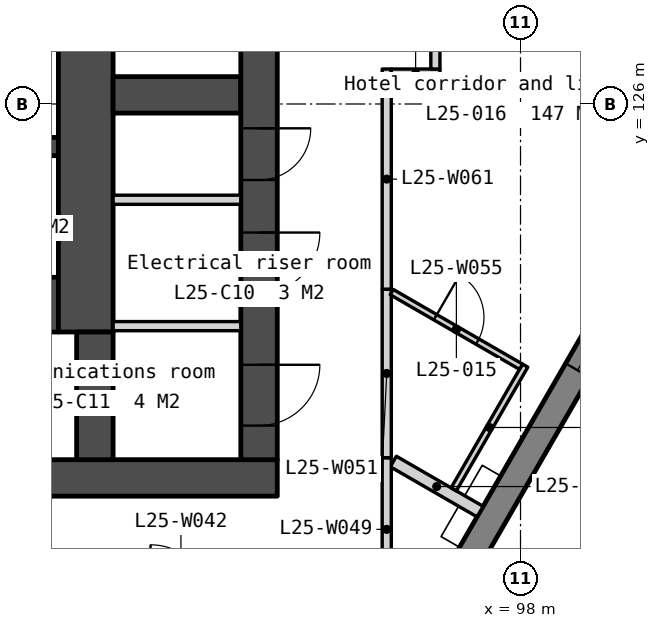
"""IFC4 building model, lengths in metres.
Left out: names, types, materials, properties, quantities, classifications, styles, units other than length and angle.
Written with IfcOpenShell. Run it as: python <this file> out.ifc"""

import sys

from ifc_helpers import new_model, si_unit, direction, frame, frame_2d, origin, place, context, subcontext, project, spatial, polyline, rectangle, outline, extrude, element, fill, save


model = new_model("IFC4")
c1 = context("Model", 3, precision=1e-05, world=origin(), true_north=direction((0.0, 1.0)))
c2 = subcontext(c1, "Body", "Model", "MODEL_VIEW")
j1 = project(units=[si_unit("LENGTHUNIT", "METRE"), si_unit("PLANEANGLEUNIT", "RADIAN")], contexts=[c1])
p1 = place(None, origin())
s1 = spatial("IfcSite", under=j1, at=p1, CompositionType="ELEMENT")
p2 = place(p1, origin())
s2 = spatial("IfcBuilding", under=s1, at=p2, CompositionType="ELEMENT")
p3 = place(p2, frame((0.0, 0.0, 102.8)))
s3 = spatial("IfcBuildingStorey", under=s2, at=p3, CompositionType="ELEMENT", Elevation=102.8)
p4 = place(p3, frame((66.0, 119.85, 0.0), z_axis=(0.0, 0.0, 1.0), x_axis=(1.0, 0.0, 0.0)))
e1 = element("IfcWall", 1, at=p4, inside=s3, PredefinedType="SOLIDWALL", context=c2, shape_type="SweptSolid", body=[
    extrude(rectangle(XDim=28.0, YDim=0.6, at=frame_2d((14.0, 0.0))), origin(), (0.0, 0.0, 1.0), 3.35),
])
p5 = place(p4, frame((6.825, 0.0, 0.0)))
e2 = element("IfcOpeningElement", 2, at=p5, cuts=e1, PredefinedType="OPENING", context=c2, shape_type="SweptSolid", body=[
    extrude(rectangle(XDim=1.8, YDim=2.1, at=frame_2d((0.9, 1.05))), frame((0.0, 0.31, 0.0), z_axis=(0.0, -1.0, 0.0), x_axis=(1.0, 0.0, 0.0)), (0.0, 0.0, 1.0), 0.62),
])
p6 = place(p4, frame((15.85, 0.0, 0.0)))
e3 = element("IfcOpeningElement", 3, at=p6, cuts=e1, PredefinedType="OPENING", context=c2, shape_type="SweptSolid", body=[
    extrude(rectangle(XDim=1.5, YDim=2.1, at=frame_2d((0.75, 1.05))), frame((0.0, 0.31, 0.0), z_axis=(0.0, -1.0, 0.0), x_axis=(1.0, 0.0, 0.0)), (0.0, 0.0, 1.0), 0.62),
])
p7 = place(p4, frame((19.375, 0.0, 0.0)))
e4 = element("IfcOpeningElement", 4, at=p7, cuts=e1, PredefinedType="OPENING", context=c2, shape_type="SweptSolid", body=[
    extrude(rectangle(XDim=1.8, YDim=2.1, at=frame_2d((0.9, 1.05))), frame((0.0, 0.31, 0.0), z_axis=(0.0, -1.0, 0.0), x_axis=(1.0, 0.0, 0.0)), (0.0, 0.0, 1.0), 0.62),
])
p8 = place(p4, frame((4.425, 0.0, 0.0)))
e5 = element("IfcOpeningElement", 5, at=p8, cuts=e1, PredefinedType="OPENING", context=c2, shape_type="SweptSolid", body=[
    extrude(rectangle(XDim=1.0, YDim=2.1, at=frame_2d((0.5, 1.05))), frame((0.0, 0.31, 0.0), z_axis=(0.0, -1.0, 0.0), x_axis=(1.0, 0.0, 0.0)), (0.0, 0.0, 1.0), 0.62),
])
p9 = place(p4, frame((9.783, 0.0, 0.0)))
e6 = element("IfcOpeningElement", 6, at=p9, cuts=e1, PredefinedType="OPENING", context=c2, shape_type="SweptSolid", body=[
    extrude(rectangle(XDim=1.0, YDim=2.1, at=frame_2d((0.5, 1.05))), frame((0.0, 0.31, 0.0), z_axis=(0.0, -1.0, 0.0), x_axis=(1.0, 0.0, 0.0)), (0.0, 0.0, 1.0), 0.62),
])
p10 = place(p4, frame((11.525, 0.0, 0.0)))
e7 = element("IfcOpeningElement", 7, at=p10, cuts=e1, PredefinedType="OPENING", context=c2, shape_type="SweptSolid", body=[
    extrude(rectangle(XDim=1.0, YDim=2.1, at=frame_2d((0.5, 1.05))), frame((0.0, 0.31, 0.0), z_axis=(0.0, -1.0, 0.0), x_axis=(1.0, 0.0, 0.0)), (0.0, 0.0, 1.0), 0.62),
])
p11 = place(p4, frame((13.658, 0.0, 0.0)))
e8 = element("IfcOpeningElement", 8, at=p11, cuts=e1, PredefinedType="OPENING", context=c2, shape_type="SweptSolid", body=[
    extrude(rectangle(XDim=1.0, YDim=2.1, at=frame_2d((0.5, 1.05))), frame((0.0, 0.31, 0.0), z_axis=(0.0, -1.0, 0.0), x_axis=(1.0, 0.0, 0.0)), (0.0, 0.0, 1.0), 0.62),
])
p12 = place(p4, frame((22.575, 0.0, 0.0)))
e9 = element("IfcOpeningElement", 9, at=p12, cuts=e1, PredefinedType="OPENING", context=c2, shape_type="SweptSolid", body=[
    extrude(rectangle(XDim=1.0, YDim=2.1, at=frame_2d((0.5, 1.05))), frame((0.0, 0.31, 0.0), z_axis=(0.0, -1.0, 0.0), x_axis=(1.0, 0.0, 0.0)), (0.0, 0.0, 1.0), 0.62),
])
p13 = place(p3, frame((87.85, 125.3, 0.0), z_axis=(0.0, 0.0, 1.0), x_axis=(1.0, 0.0, 0.0)))
e10 = element("IfcWall", 10, at=p13, inside=s3, PredefinedType="SOLIDWALL", context=c2, shape_type="SweptSolid", body=[
    extrude(rectangle(XDim=2.55, YDim=0.3, at=frame_2d((1.275, 0.0))), origin(), (0.0, 0.0, 1.0), 3.35),
])
p14 = place(p3, frame((87.85, 122.7, 0.0), z_axis=(0.0, 0.0, 1.0), x_axis=(1.0, 0.0, 0.0)))
e11 = element("IfcWall", 11, at=p14, inside=s3, PredefinedType="SOLIDWALL", context=c2, shape_type="SweptSolid", body=[
    extrude(rectangle(XDim=2.55, YDim=0.9, at=frame_2d((1.275, 0.0))), origin(), (0.0, 0.0, 1.0), 3.35),
])
p15 = place(p3, frame((90.85, 133.95, 0.0), z_axis=(0.0, 0.0, 1.0), x_axis=(0.0, -1.0, 0.0)))
e12 = element("IfcWall", 12, at=p15, inside=s3, PredefinedType="SOLIDWALL", context=c2, shape_type="SweptSolid", body=[
    extrude(rectangle(XDim=11.7, YDim=0.9, at=frame_2d((5.85, 0.0))), origin(), (0.0, 0.0, 1.0), 3.35),
])
p16 = place(p3, frame((91.0, 122.25, 0.0), z_axis=(0.0, 0.0, 1.0), x_axis=(0.0, -1.0, 0.0)))
e13 = element("IfcWall", 13, at=p16, inside=s3, PredefinedType="SOLIDWALL", context=c2, shape_type="SweptSolid", body=[
    extrude(rectangle(XDim=2.1, YDim=0.6, at=frame_2d((1.05, 0.0))), origin(), (0.0, 0.0, 1.0), 3.35),
])
p17 = place(p3, frame((91.3, 126.15, 0.0), z_axis=(0.0, 0.0, 1.0), x_axis=(1.0, 0.0, 0.0)))
e14 = element("IfcWall", 14, at=p17, inside=s3, PredefinedType="SOLIDWALL", context=c2, shape_type="SweptSolid", body=[
    extrude(rectangle(XDim=2.1, YDim=0.6, at=frame_2d((1.05, 0.0))), origin(), (0.0, 0.0, 1.0), 3.35),
])
for number, where, z_axis, x_axis in (
    (15, (91.3, 124.425, 0.0), (0.0, 0.0, 1.0), (1.0, 0.0, 0.0)),
    (16, (91.3, 122.346, 0.0), (0.0, 0.0, 1.0), (1.0, 0.0, 0.0)),
):
    element("IfcWall", number, at=place(p3, frame(where, z_axis=z_axis, x_axis=x_axis)), inside=s3, PredefinedType="PARTITIONING", context=c2, shape_type="SweptSolid", body=[
        extrude(rectangle(XDim=2.1, YDim=0.15, at=frame_2d((1.05, 0.0))), origin(), (0.0, 0.0, 1.0), 3.35),
    ])
p18 = place(p3, frame((93.7, 133.95, 0.0), z_axis=(0.0, 0.0, 1.0), x_axis=(0.0, -1.0, 0.0)))
e17 = element("IfcWall", 17, at=p18, inside=s3, PredefinedType="SOLIDWALL", context=c2, shape_type="SweptSolid", body=[
    extrude(rectangle(XDim=13.8, YDim=0.6, at=frame_2d((6.9, 0.0))), origin(), (0.0, 0.0, 1.0), 3.35),
])
p19 = place(p18, frame((0.6, 0.0, 0.0)))
e18 = element("IfcOpeningElement", 18, at=p19, cuts=e17, PredefinedType="OPENING", context=c2, shape_type="SweptSolid", body=[
    extrude(rectangle(XDim=1.1, YDim=2.1, at=frame_2d((0.55, 1.05))), frame((0.0, 0.31, 0.0), z_axis=(0.0, -1.0, 0.0), x_axis=(1.0, 0.0, 0.0)), (0.0, 0.0, 1.0), 0.62),
])
p20 = place(p18, frame((10.064, 0.0, 0.0)))
e19 = element("IfcOpeningElement", 19, at=p20, cuts=e17, PredefinedType="OPENING", context=c2, shape_type="SweptSolid", body=[
    extrude(rectangle(XDim=1.0, YDim=2.1, at=frame_2d((0.5, 1.05))), frame((0.0, 0.31, 0.0), z_axis=(0.0, -1.0, 0.0), x_axis=(1.0, 0.0, 0.0)), (0.0, 0.0, 1.0), 0.62),
])
p21 = place(p18, frame((8.35, 0.0, 0.0)))
e20 = element("IfcOpeningElement", 20, at=p21, cuts=e17, PredefinedType="OPENING", context=c2, shape_type="SweptSolid", body=[
    extrude(rectangle(XDim=0.85, YDim=2.1, at=frame_2d((0.425, 1.05))), frame((0.0, 0.31, 0.0), z_axis=(0.0, -1.0, 0.0), x_axis=(1.0, 0.0, 0.0)), (0.0, 0.0, 1.0), 0.62),
])
p22 = place(p18, frame((12.239, 0.0, 0.0)))
e21 = element("IfcOpeningElement", 21, at=p22, cuts=e17, PredefinedType="OPENING", context=c2, shape_type="SweptSolid", body=[
    extrude(rectangle(XDim=1.0, YDim=2.1, at=frame_2d((0.5, 1.05))), frame((0.0, 0.31, 0.0), z_axis=(0.0, -1.0, 0.0), x_axis=(1.0, 0.0, 0.0)), (0.0, 0.0, 1.0), 0.62),
])
p23 = place(p3, frame((82.605, 93.333, -0.15), z_axis=(0.0, 0.0, 1.0), x_axis=(0.500000478905, 0.866025127289, 0.0)))
e22 = element("IfcWall", 22, at=p23, inside=s3, PredefinedType="SOLIDWALL", context=c2, shape_type="SweptSolid", body=[
    extrude(outline(polyline([(42.643, 0.0), (42.643, 3.5), (0.0, 3.5), (0.0, 0.0), (42.643, 0.0)])), frame((0.0, 0.225, 0.0), z_axis=(0.0, -1.0, 0.0), x_axis=(1.0, 0.0, 0.0)), (0.0, 0.0, 1.0), 0.45),
])
p24 = place(p23, frame((0.72, 0.0, 1.05)))
e23 = element("IfcOpeningElement", 23, at=p24, cuts=e22, PredefinedType="OPENING", context=c2, shape_type="SweptSolid", body=[
    extrude(rectangle(XDim=1.2, YDim=1.5, at=frame_2d((0.6, 0.75))), frame((0.0, 0.235, 0.0), z_axis=(0.0, -1.0, 0.0), x_axis=(1.0, 0.0, 0.0)), (0.0, 0.0, 1.0), 0.47),
])
p25 = place(p23, frame((7.079, 0.0, 1.05)))
e24 = element("IfcOpeningElement", 24, at=p25, cuts=e22, PredefinedType="OPENING", context=c2, shape_type="SweptSolid", body=[
    extrude(rectangle(XDim=1.2, YDim=1.5, at=frame_2d((0.6, 0.75))), frame((0.0, 0.235, 0.0), z_axis=(0.0, -1.0, 0.0), x_axis=(1.0, 0.0, 0.0)), (0.0, 0.0, 1.0), 0.47),
])
p26 = place(p23, frame((8.779, 0.0, 1.05)))
e25 = element("IfcOpeningElement", 25, at=p26, cuts=e22, PredefinedType="OPENING", context=c2, shape_type="SweptSolid", body=[
    extrude(rectangle(XDim=1.2, YDim=1.5, at=frame_2d((0.6, 0.75))), frame((0.0, 0.235, 0.0), z_axis=(0.0, -1.0, 0.0), x_axis=(1.0, 0.0, 0.0)), (0.0, 0.0, 1.0), 0.47),
])
p27 = place(p23, frame((15.607, 0.0, 1.05)))
e26 = element("IfcOpeningElement", 26, at=p27, cuts=e22, PredefinedType="OPENING", context=c2, shape_type="SweptSolid", body=[
    extrude(rectangle(XDim=1.2, YDim=1.5, at=frame_2d((0.6, 0.75))), frame((0.0, 0.235, 0.0), z_axis=(0.0, -1.0, 0.0), x_axis=(1.0, 0.0, 0.0)), (0.0, 0.0, 1.0), 0.47),
])
p28 = place(p23, frame((17.307, 0.0, 1.05)))
e27 = element("IfcOpeningElement", 27, at=p28, cuts=e22, PredefinedType="OPENING", context=c2, shape_type="SweptSolid", body=[
    extrude(rectangle(XDim=1.2, YDim=1.5, at=frame_2d((0.6, 0.75))), frame((0.0, 0.235, 0.0), z_axis=(0.0, -1.0, 0.0), x_axis=(1.0, 0.0, 0.0)), (0.0, 0.0, 1.0), 0.47),
])
p29 = place(p23, frame((24.136, 0.0, 1.05)))
e28 = element("IfcOpeningElement", 28, at=p29, cuts=e22, PredefinedType="OPENING", context=c2, shape_type="SweptSolid", body=[
    extrude(rectangle(XDim=1.2, YDim=1.5, at=frame_2d((0.6, 0.75))), frame((0.0, 0.235, 0.0), z_axis=(0.0, -1.0, 0.0), x_axis=(1.0, 0.0, 0.0)), (0.0, 0.0, 1.0), 0.47),
])
p30 = place(p23, frame((25.836, 0.0, 1.05)))
e29 = element("IfcOpeningElement", 29, at=p30, cuts=e22, PredefinedType="OPENING", context=c2, shape_type="SweptSolid", body=[
    extrude(rectangle(XDim=1.2, YDim=1.5, at=frame_2d((0.6, 0.75))), frame((0.0, 0.235, 0.0), z_axis=(0.0, -1.0, 0.0), x_axis=(1.0, 0.0, 0.0)), (0.0, 0.0, 1.0), 0.47),
])
p31 = place(p23, frame((32.665, 0.0, 1.05)))
e30 = element("IfcOpeningElement", 30, at=p31, cuts=e22, PredefinedType="OPENING", context=c2, shape_type="SweptSolid", body=[
    extrude(rectangle(XDim=1.2, YDim=1.5, at=frame_2d((0.6, 0.75))), frame((0.0, 0.235, 0.0), z_axis=(0.0, -1.0, 0.0), x_axis=(1.0, 0.0, 0.0)), (0.0, 0.0, 1.0), 0.47),
])
p32 = place(p23, frame((34.365, 0.0, 1.05)))
e31 = element("IfcOpeningElement", 31, at=p32, cuts=e22, PredefinedType="OPENING", context=c2, shape_type="SweptSolid", body=[
    extrude(rectangle(XDim=1.2, YDim=1.5, at=frame_2d((0.6, 0.75))), frame((0.0, 0.235, 0.0), z_axis=(0.0, -1.0, 0.0), x_axis=(1.0, 0.0, 0.0)), (0.0, 0.0, 1.0), 0.47),
])
p33 = place(p23, frame((40.722, 0.0, 1.05)))
e32 = element("IfcOpeningElement", 32, at=p33, cuts=e22, PredefinedType="OPENING", context=c2, shape_type="SweptSolid", body=[
    extrude(rectangle(XDim=1.2, YDim=1.5, at=frame_2d((0.6, 0.75))), frame((0.0, 0.235, 0.0), z_axis=(0.0, -1.0, 0.0), x_axis=(1.0, 0.0, 0.0)), (0.0, 0.0, 1.0), 0.47),
])
p34 = place(p3, frame((95.908, 120.12, 0.0), z_axis=(0.0, 0.0, 1.0), x_axis=(0.866101713734, -0.499867803992, 0.0)))
e33 = element("IfcWall", 33, at=p34, inside=s3, PredefinedType="PARTITIONING", context=c2, shape_type="SweptSolid", body=[
    extrude(rectangle(XDim=1.648, YDim=0.2, at=frame_2d((0.824, 0.0))), origin(), (0.0, 0.0, 1.0), 3.35),
])
p35 = place(p3, frame((95.8, 117.825, 0.0), z_axis=(0.0, 0.0, 1.0), x_axis=(0.0, 1.0, 0.0)))
e34 = element("IfcWall", 34, at=p35, inside=s3, PredefinedType="PARTITIONING", context=c2, shape_type="SweptSolid", body=[
    extrude(rectangle(XDim=2.358, YDim=0.15, at=frame_2d((1.179, 0.0))), origin(), (0.0, 0.0, 1.0), 3.35),
])
p36 = place(p3, frame((95.8, 120.183, 0.0), z_axis=(0.0, 0.0, 1.0), x_axis=(0.0, 1.0, 0.0)))
e35 = element("IfcWall", 35, at=p36, inside=s3, PredefinedType="PARTITIONING", context=c2, shape_type="SweptSolid", body=[
    extrude(rectangle(XDim=2.771, YDim=0.15, at=frame_2d((1.386, 0.0))), origin(), (0.0, 0.0, 1.0), 3.35),
])
p37 = place(p3, frame((96.902, 119.662, 0.0), z_axis=(0.0, 0.0, 1.0), x_axis=(0.500016218704, 0.866016039709, 0.0)))
e36 = element("IfcWall", 36, at=p37, inside=s3, PredefinedType="PARTITIONING", context=c2, shape_type="SweptSolid", body=[
    extrude(rectangle(XDim=2.35, YDim=0.1, at=frame_2d((1.175, 0.0))), origin(), (0.0, 0.0, 1.0), 3.35),
])
p38 = place(p3, frame((95.882, 122.906, 0.0), z_axis=(0.0, 0.0, 1.0), x_axis=(0.866006720078, -0.500032359733, 0.0)))
e37 = element("IfcWall", 37, at=p38, inside=s3, PredefinedType="PARTITIONING", context=c2, shape_type="SweptSolid", body=[
    extrude(rectangle(XDim=2.455, YDim=0.1, at=frame_2d((1.228, 0.0))), origin(), (0.0, 0.0, 1.0), 3.35),
])
p39 = place(p38, frame((0.827, 0.0, 0.0)))
e38 = element("IfcOpeningElement", 38, at=p39, cuts=e37, PredefinedType="OPENING", context=c2, shape_type="SweptSolid", body=[
    extrude(rectangle(XDim=0.8, YDim=2.1, at=frame_2d((0.4, 1.05))), frame((0.0, 0.06, 0.0), z_axis=(0.0, -1.0, 0.0), x_axis=(1.0, 0.0, 0.0)), (0.0, 0.0, 1.0), 0.12),
])
p40 = place(p3, frame((95.8, 122.954, 0.0), z_axis=(0.0, 0.0, 1.0), x_axis=(0.0, 1.0, 0.0)))
e39 = element("IfcWall", 39, at=p40, inside=s3, PredefinedType="PARTITIONING", context=c2, shape_type="SweptSolid", body=[
    extrude(rectangle(XDim=3.621, YDim=0.15, at=frame_2d((1.811, 0.0))), origin(), (0.0, 0.0, 1.0), 3.35),
])
p41 = place(p3, frame((95.875, 126.5, 0.0), z_axis=(0.0, 0.0, 1.0), x_axis=(0.999999813758, 0.000610314198, 0.0)))
e40 = element("IfcWall", 40, at=p41, inside=s3, PredefinedType="PARTITIONING", context=c2, shape_type="SweptSolid", body=[
    extrude(rectangle(XDim=0.8, YDim=0.15, at=frame_2d((0.4, 0.0))), origin(), (0.0, 0.0, 1.0), 3.35),
])
p42 = place(p3, frame((96.6, 133.925, 0.0), z_axis=(0.0, 0.0, 1.0), x_axis=(6.6436354e-05, -0.999999997793, 0.0)))
e41 = element("IfcWall", 41, at=p42, inside=s3, PredefinedType="PARTITIONING", context=c2, shape_type="SweptSolid", body=[
    extrude(rectangle(XDim=7.35, YDim=0.15, at=frame_2d((3.675, 0.0))), origin(), (0.0, 0.0, 1.0), 3.35),
])
p43 = place(p42, frame((3.225, 0.0, 0.0)))
e42 = element("IfcOpeningElement", 42, at=p43, cuts=e41, PredefinedType="OPENING", context=c2, shape_type="SweptSolid", body=[
    extrude(rectangle(XDim=0.9, YDim=2.1, at=frame_2d((0.45, 1.05))), frame((0.0, 0.085, 0.0), z_axis=(0.0, -1.0, 0.0), x_axis=(1.0, 0.0, 0.0)), (0.0, 0.0, 1.0), 0.17),
])
p44 = place(p20, origin())
e43 = element("IfcDoor", 43, at=p44, inside=s3, OperationType="SINGLE_SWING_LEFT", PredefinedType="DOOR", context=c2, shape_type="SweptSolid", body=[
    extrude(rectangle(XDim=1.0, YDim=2.1, at=frame_2d((0.5, 1.05))), frame((0.0, 0.025, 0.0), z_axis=(0.0, -1.0, 0.0), x_axis=(1.0, 0.0, 0.0)), (0.0, 0.0, 1.0), 0.05),
])
fill(e19, e43)
p45 = place(p21, origin())
e44 = element("IfcDoor", 44, at=p45, inside=s3, OperationType="SINGLE_SWING_LEFT", PredefinedType="DOOR", context=c2, shape_type="SweptSolid", body=[
    extrude(rectangle(XDim=0.85, YDim=2.1, at=frame_2d((0.425, 1.05))), frame((0.0, 0.025, 0.0), z_axis=(0.0, -1.0, 0.0), x_axis=(1.0, 0.0, 0.0)), (0.0, 0.0, 1.0), 0.05),
])
fill(e20, e44)
p46 = place(p22, origin())
e45 = element("IfcDoor", 45, at=p46, inside=s3, OperationType="SINGLE_SWING_LEFT", PredefinedType="DOOR", context=c2, shape_type="SweptSolid", body=[
    extrude(rectangle(XDim=1.0, YDim=2.1, at=frame_2d((0.5, 1.05))), frame((0.0, 0.025, 0.0), z_axis=(0.0, -1.0, 0.0), x_axis=(1.0, 0.0, 0.0)), (0.0, 0.0, 1.0), 0.05),
])
fill(e21, e45)
p47 = place(p31, origin())
e46 = element("IfcWindow", 46, at=p47, inside=s3, PartitioningType="SINGLE_PANEL", PredefinedType="WINDOW", context=c2, shape_type="SweptSolid", body=[
    extrude(rectangle(XDim=1.2, YDim=1.5, at=frame_2d((0.6, 0.75))), frame((0.0, 0.03, 0.0), z_axis=(0.0, -1.0, 0.0), x_axis=(1.0, 0.0, 0.0)), (0.0, 0.0, 1.0), 0.06),
])
fill(e30, e46)
p48 = place(p39, origin())
e47 = element("IfcDoor", 47, at=p48, inside=s3, OperationType="SINGLE_SWING_LEFT", PredefinedType="DOOR", context=c2, shape_type="SweptSolid", body=[
    extrude(rectangle(XDim=0.8, YDim=2.1, at=frame_2d((0.4, 1.05))), frame((0.0, 0.025, 0.0), z_axis=(0.0, -1.0, 0.0), x_axis=(1.0, 0.0, 0.0)), (0.0, 0.0, 1.0), 0.05),
])
fill(e38, e47)
save(model, sys.argv[1])
